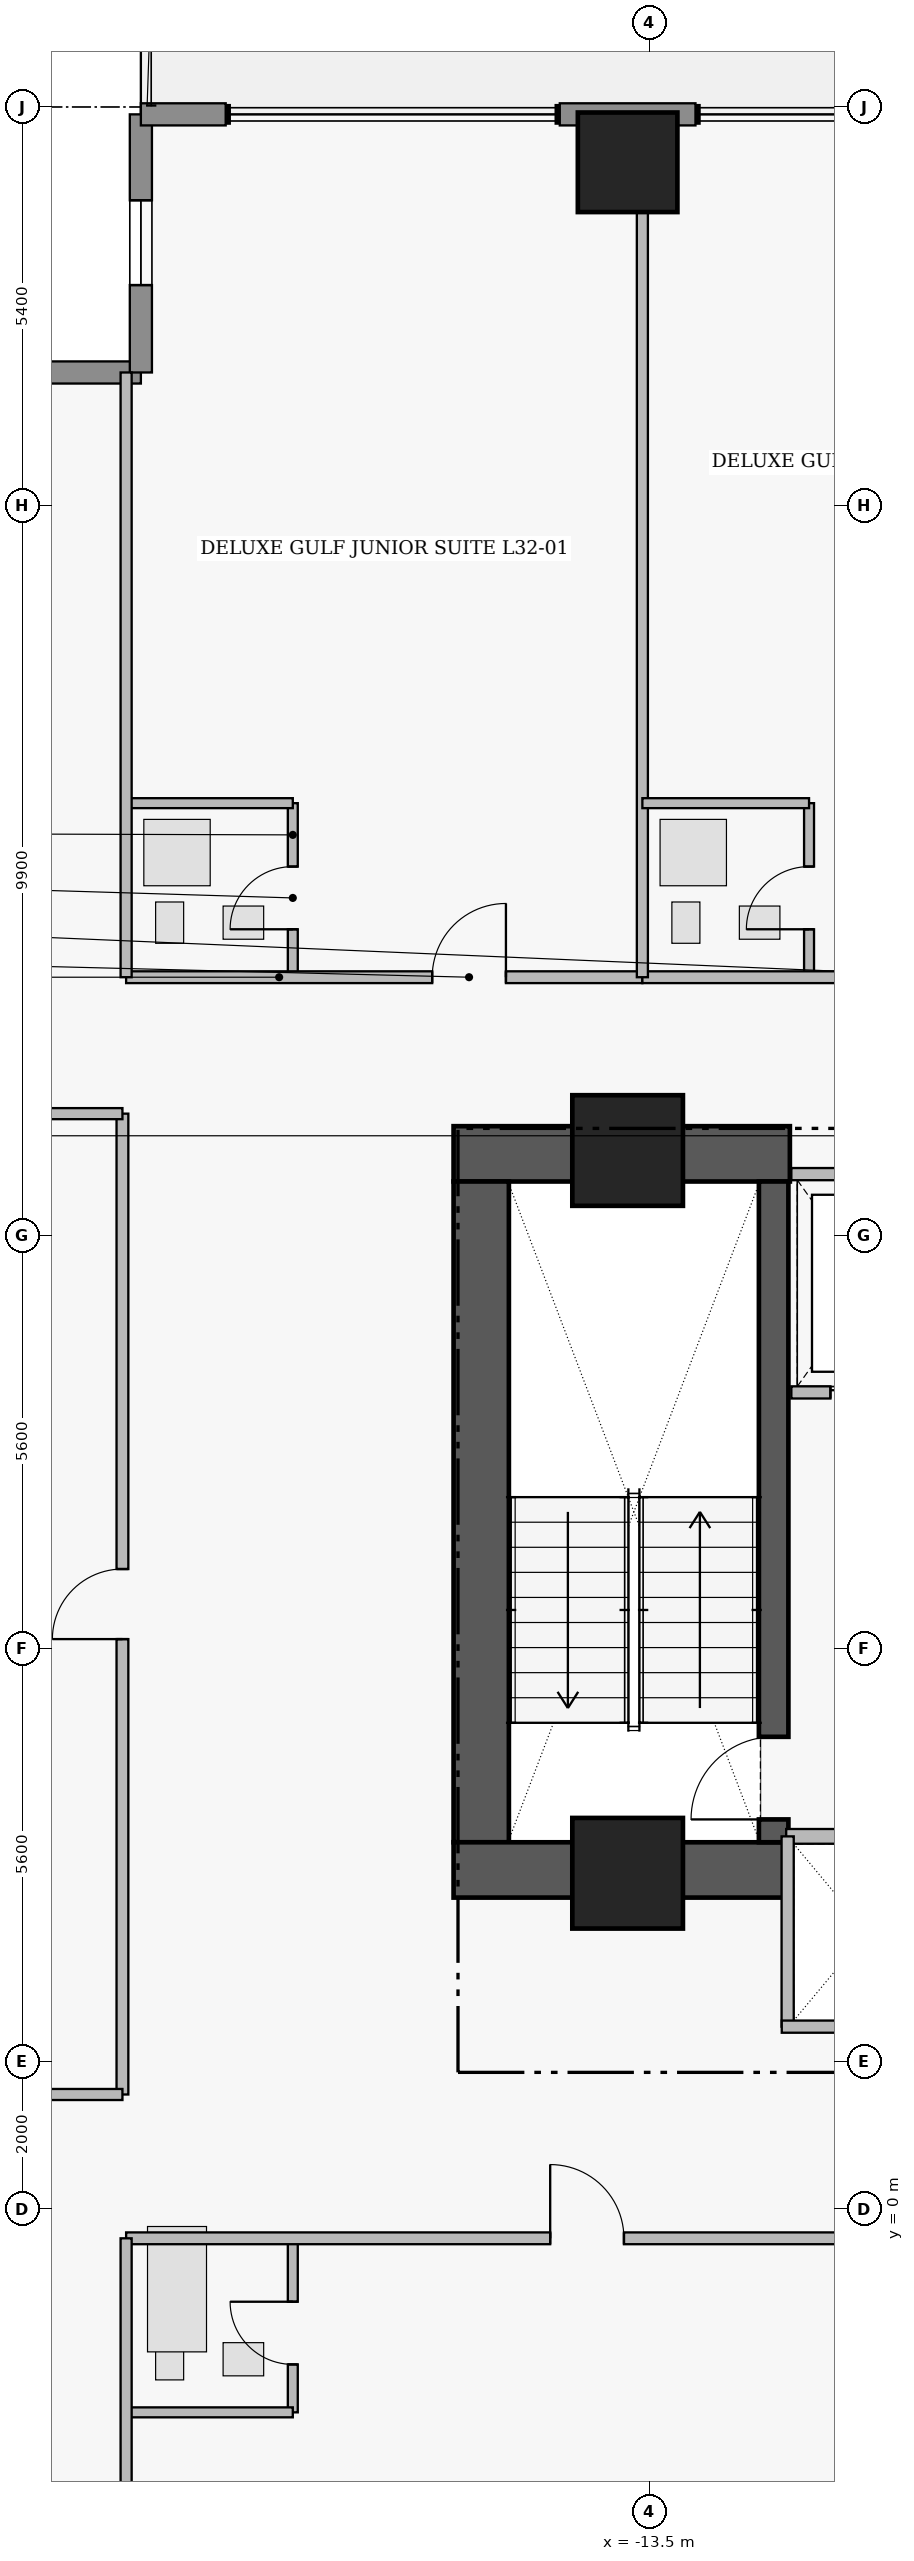
"""IFC4 building model, lengths in metres.
Left out: names, types, materials, properties, quantities, classifications, styles, units other than length and angle.
Written with IfcOpenShell. Run it as: python <this file> out.ifc"""

import sys

from ifc_helpers import new_model, si_unit, direction, frame, frame_2d, origin, origin_2d, place, context, subcontext, project, spatial, rectangle, extrude, element, fill, save


model = new_model("IFC4")
c1 = context("Model", 3, precision=1e-05, world=origin(), true_north=direction((0.0, 1.0)))
c2 = subcontext(c1, "Body", "Model", "MODEL_VIEW")
j1 = project(units=[si_unit("LENGTHUNIT", "METRE"), si_unit("PLANEANGLEUNIT", "RADIAN")], contexts=[c1])
p1 = place(None, origin())
s1 = spatial("IfcSite", under=j1, at=p1, CompositionType="ELEMENT")
p2 = place(p1, origin())
s2 = spatial("IfcBuilding", under=s1, at=p2, CompositionType="ELEMENT")
p3 = place(p2, frame((0.0, 0.0, 128.5)))
s3 = spatial("IfcBuildingStorey", under=s2, at=p3, CompositionType="ELEMENT", Elevation=128.5)
p4 = place(p3, frame((-16.16, 14.305, 0.0), z_axis=(0.0, 0.0, 1.0), x_axis=(1.0, 0.0, 0.0)))
e1 = element("IfcWall", 1, at=p4, inside=s3, PredefinedType="SHEAR", context=c2, shape_type="SweptSolid", body=[
    extrude(rectangle(XDim=4.56, YDim=0.75, at=frame_2d((2.28, 0.0))), origin(), (0.0, 0.0, 1.0), 3.46),
])
p5 = place(p3, frame((-15.785, 4.97, 0.0), z_axis=(0.0, 0.0, 1.0), x_axis=(0.0, 1.0, 0.0)))
e2 = element("IfcWall", 2, at=p5, inside=s3, PredefinedType="SHEAR", context=c2, shape_type="SweptSolid", body=[
    extrude(rectangle(XDim=8.96, YDim=0.75, at=frame_2d((4.48, 0.0))), origin(), (0.0, 0.0, 1.0), 3.46),
])
p6 = place(p3, frame((-16.16, 4.595, 0.0), z_axis=(0.0, 0.0, 1.0), x_axis=(1.0, 0.0, 0.0)))
e3 = element("IfcWall", 3, at=p6, inside=s3, PredefinedType="SHEAR", context=c2, shape_type="SweptSolid", body=[
    extrude(rectangle(XDim=4.56, YDim=0.75, at=frame_2d((2.28, 0.0))), origin(), (0.0, 0.0, 1.0), 3.46),
])
p7 = place(p3, frame((-11.82, 4.97, 0.0), z_axis=(0.0, 0.0, 1.0), x_axis=(0.0, 1.0, 0.0)))
e4 = element("IfcWall", 4, at=p7, inside=s3, PredefinedType="SHEAR", context=c2, shape_type="SweptSolid", body=[
    extrude(rectangle(XDim=8.96, YDim=0.4, at=frame_2d((4.48, 0.0))), origin(), (0.0, 0.0, 1.0), 3.46),
])
p8 = place(p7, frame((0.31, 0.0, 0.0)))
e5 = element("IfcOpeningElement", 5, at=p8, cuts=e4, PredefinedType="OPENING", context=c2, shape_type="SweptSolid", body=[
    extrude(rectangle(XDim=1.12, YDim=2.22, at=frame_2d((0.56, 1.11))), frame((0.0, 0.21, 0.0), z_axis=(0.0, -1.0, 0.0), x_axis=(1.0, 0.0, 0.0)), (0.0, 0.0, 1.0), 0.42),
])
for number, where, z_axis, x_axis in (
    (6, (-13.8, 14.35, 0.0), (0.0, 0.0, 1.0), (1.0, 0.0, 0.0)),
    (7, (-13.8, 4.55, 0.0), (0.0, 0.0, 1.0), (1.0, 0.0, 0.0)),
):
    element("IfcColumn", number, at=place(p3, frame(where, z_axis=z_axis, x_axis=x_axis)), inside=s3, PredefinedType="COLUMN", context=c2, shape_type="SweptSolid", body=[
        extrude(rectangle(XDim=1.5, YDim=1.5, at=origin_2d()), origin(), (0.0, 0.0, 1.0), 3.65),
    ])
p9 = place(p3, frame((-13.8, 27.75, 0.0), z_axis=(0.0, 0.0, 1.0), x_axis=(1.0, 0.0, 0.0)))
e8 = element("IfcColumn", 8, at=p9, inside=s3, PredefinedType="COLUMN", context=c2, shape_type="SweptSolid", body=[
    extrude(rectangle(XDim=1.35, YDim=1.35, at=origin_2d()), origin(), (0.0, 0.0, 1.0), 3.65),
])
p10 = place(p3, frame((-23.9, 24.9, 0.0), z_axis=(0.0, 0.0, 1.0), x_axis=(1.0, 0.0, 0.0)))
e9 = element("IfcWall", 9, at=p10, inside=s3, PredefinedType="STANDARD", context=c2, shape_type="SweptSolid", body=[
    extrude(rectangle(XDim=3.5, YDim=0.3, at=frame_2d((1.75, 0.0))), origin(), (0.0, 0.0, 1.0), 3.43),
])
p11 = place(p10, frame((1.065, 0.0, 1.25)))
e10 = element("IfcOpeningElement", 10, at=p11, cuts=e9, PredefinedType="OPENING", context=c2, shape_type="SweptSolid", body=[
    extrude(rectangle(XDim=1.15, YDim=1.55, at=frame_2d((0.575, 0.775))), frame((0.0, 0.16, 0.0), z_axis=(0.0, -1.0, 0.0), x_axis=(1.0, 0.0, 0.0)), (0.0, 0.0, 1.0), 0.32),
])
p12 = place(p3, frame((-20.4, 24.9, 0.0), z_axis=(0.0, 0.0, 1.0), x_axis=(0.0, 1.0, 0.0)))
e11 = element("IfcWall", 11, at=p12, inside=s3, PredefinedType="STANDARD", context=c2, shape_type="SweptSolid", body=[
    extrude(rectangle(XDim=3.5, YDim=0.3, at=frame_2d((1.75, 0.0))), origin(), (0.0, 0.0, 1.0), 3.43),
])
p13 = place(p12, frame((1.185, 0.0, 1.25)))
e12 = element("IfcOpeningElement", 12, at=p13, cuts=e11, PredefinedType="OPENING", context=c2, shape_type="SweptSolid", body=[
    extrude(rectangle(XDim=1.15, YDim=1.55, at=frame_2d((0.575, 0.775))), frame((0.0, 0.16, 0.0), z_axis=(0.0, -1.0, 0.0), x_axis=(1.0, 0.0, 0.0)), (0.0, 0.0, 1.0), 0.32),
])
p14 = place(p3, frame((-20.4, 28.4, 0.0), z_axis=(0.0, 0.0, 1.0), x_axis=(1.0, 0.0, 0.0)))
e13 = element("IfcWall", 13, at=p14, inside=s3, PredefinedType="STANDARD", context=c2, shape_type="SweptSolid", body=[
    extrude(rectangle(XDim=1.15, YDim=0.3, at=frame_2d((0.575, 0.0))), origin(), (0.0, 0.0, 1.0), 3.43),
])
p15 = place(p3, frame((-14.72, 28.4, 0.0), z_axis=(0.0, 0.0, 1.0), x_axis=(1.0, 0.0, 0.0)))
e14 = element("IfcWall", 14, at=p15, inside=s3, PredefinedType="STANDARD", context=c2, shape_type="SweptSolid", body=[
    extrude(rectangle(XDim=1.84, YDim=0.3, at=frame_2d((0.92, 0.0))), origin(), (0.0, 0.0, 1.0), 3.43),
])
p16 = place(p3, frame((-11.58, 11.07, 0.0), z_axis=(0.0, 0.0, 1.0), x_axis=(1.0, 0.0, 0.0)))
e15 = element("IfcWall", 15, at=p16, inside=s3, PredefinedType="PARTITIONING", context=c2, shape_type="SweptSolid", body=[
    extrude(rectangle(XDim=2.16, YDim=0.165, at=frame_2d((1.08, 0.0))), origin(), (0.0, 0.0, 1.0), 3.43),
])
p17 = place(p16, frame((0.53, 0.0, 0.0)))
e16 = element("IfcOpeningElement", 16, at=p17, cuts=e15, PredefinedType="OPENING", context=c2, shape_type="SweptSolid", body=[
    extrude(rectangle(XDim=1.15, YDim=2.25, at=frame_2d((0.575, 1.125))), frame((0.0, 0.093, 0.0), z_axis=(0.0, -1.0, 0.0), x_axis=(1.0, 0.0, 0.0)), (0.0, 0.0, 1.0), 0.185),
])
p18 = place(p3, frame((-18.34, 16.7, 0.0), z_axis=(0.0, 0.0, 1.0), x_axis=(0.0, 1.0, 0.0)))
e17 = element("IfcWall", 17, at=p18, inside=s3, PredefinedType="PLUMBINGWALL", context=c2, shape_type="SweptSolid", body=[
    extrude(rectangle(XDim=2.36, YDim=0.135, at=frame_2d((1.18, 0.0))), origin(), (0.0, 0.0, 1.0), 3.43),
])
p19 = place(p18, frame((0.65, 0.0, 0.0)))
e18 = element("IfcOpeningElement", 18, at=p19, cuts=e17, PredefinedType="OPENING", context=c2, shape_type="SweptSolid", body=[
    extrude(rectangle(XDim=0.85, YDim=2.1, at=frame_2d((0.425, 1.05))), frame((0.0, 0.077, 0.0), z_axis=(0.0, -1.0, 0.0), x_axis=(1.0, 0.0, 0.0)), (0.0, 0.0, 1.0), 0.155),
])
p20 = place(p3, frame((-20.6, 16.7, 0.0), z_axis=(0.0, 0.0, 1.0), x_axis=(1.0, 0.0, 0.0)))
e19 = element("IfcWall", 19, at=p20, inside=s3, PredefinedType="PARTITIONING", context=c2, shape_type="SweptSolid", body=[
    extrude(rectangle(XDim=7.0, YDim=0.16, at=frame_2d((3.5, 0.0))), origin(), (0.0, 0.0, 1.0), 3.43),
])
p21 = place(p20, frame((4.15, 0.0, 0.0)))
e20 = element("IfcOpeningElement", 20, at=p21, cuts=e19, PredefinedType="OPENING", context=c2, shape_type="SweptSolid", body=[
    extrude(rectangle(XDim=1.0, YDim=2.15, at=frame_2d((0.5, 1.075))), frame((0.0, 0.09, 0.0), z_axis=(0.0, -1.0, 0.0), x_axis=(1.0, 0.0, 0.0)), (0.0, 0.0, 1.0), 0.18),
])
p22 = place(p3, frame((-11.34, 16.7, 0.0), z_axis=(0.0, 0.0, 1.0), x_axis=(0.0, 1.0, 0.0)))
e21 = element("IfcWall", 21, at=p22, inside=s3, PredefinedType="PLUMBINGWALL", context=c2, shape_type="SweptSolid", body=[
    extrude(rectangle(XDim=2.36, YDim=0.135, at=frame_2d((1.18, 0.0))), origin(), (0.0, 0.0, 1.0), 3.43),
])
p23 = place(p22, frame((0.65, 0.0, 0.0)))
e22 = element("IfcOpeningElement", 22, at=p23, cuts=e21, PredefinedType="OPENING", context=c2, shape_type="SweptSolid", body=[
    extrude(rectangle(XDim=0.85, YDim=2.1, at=frame_2d((0.425, 1.05))), frame((0.0, 0.077, 0.0), z_axis=(0.0, -1.0, 0.0), x_axis=(1.0, 0.0, 0.0)), (0.0, 0.0, 1.0), 0.155),
])
p24 = place(p3, frame((-13.6, 16.7, 0.0), z_axis=(0.0, 0.0, 1.0), x_axis=(1.0, 0.0, 0.0)))
e23 = element("IfcWall", 23, at=p24, inside=s3, PredefinedType="PARTITIONING", context=c2, shape_type="SweptSolid", body=[
    extrude(rectangle(XDim=6.8, YDim=0.16, at=frame_2d((3.4, 0.0))), origin(), (0.0, 0.0, 1.0), 2.973),
])
p25 = place(p24, frame((4.075, 0.0, 0.0)))
e24 = element("IfcOpeningElement", 24, at=p25, cuts=e23, PredefinedType="OPENING", context=c2, shape_type="SweptSolid", body=[
    extrude(rectangle(XDim=0.95, YDim=2.15, at=frame_2d((0.475, 1.075))), frame((0.0, 0.09, 0.0), z_axis=(0.0, -1.0, 0.0), x_axis=(1.0, 0.0, 0.0)), (0.0, 0.0, 1.0), 0.18),
])
p26 = place(p3, frame((-18.34, -2.76, 0.0), z_axis=(0.0, 0.0, 1.0), x_axis=(0.0, 1.0, 0.0)))
e25 = element("IfcWall", 25, at=p26, inside=s3, PredefinedType="PLUMBINGWALL", context=c2, shape_type="SweptSolid", body=[
    extrude(rectangle(XDim=2.36, YDim=0.135, at=frame_2d((1.18, 0.0))), origin(), (0.0, 0.0, 1.0), 3.43),
])
p27 = place(p26, frame((0.65, 0.0, 0.0)))
e26 = element("IfcOpeningElement", 26, at=p27, cuts=e25, PredefinedType="OPENING", context=c2, shape_type="SweptSolid", body=[
    extrude(rectangle(XDim=0.85, YDim=2.1, at=frame_2d((0.425, 1.05))), frame((0.0, 0.077, 0.0), z_axis=(0.0, -1.0, 0.0), x_axis=(1.0, 0.0, 0.0)), (0.0, 0.0, 1.0), 0.155),
])
p28 = place(p3, frame((-20.6, -0.4, 0.0), z_axis=(0.0, 0.0, 1.0), x_axis=(1.0, 0.0, 0.0)))
e27 = element("IfcWall", 27, at=p28, inside=s3, PredefinedType="PARTITIONING", context=c2, shape_type="SweptSolid", body=[
    extrude(rectangle(XDim=10.2, YDim=0.16, at=frame_2d((5.1, 0.0))), origin(), (0.0, 0.0, 1.0), 3.43),
])
p29 = place(p28, frame((5.75, 0.0, 0.0)))
e28 = element("IfcOpeningElement", 28, at=p29, cuts=e27, PredefinedType="OPENING", context=c2, shape_type="SweptSolid", body=[
    extrude(rectangle(XDim=1.0, YDim=2.15, at=frame_2d((0.5, 1.075))), frame((0.0, 0.09, 0.0), z_axis=(0.0, -1.0, 0.0), x_axis=(1.0, 0.0, 0.0)), (0.0, 0.0, 1.0), 0.18),
])
p30 = place(p3, frame((-20.65, 1.55, 0.0), z_axis=(0.0, 0.0, 1.0), x_axis=(0.0, 1.0, 0.0)))
e29 = element("IfcWall", 29, at=p30, inside=s3, PredefinedType="PARTITIONING", context=c2, shape_type="SweptSolid", body=[
    extrude(rectangle(XDim=13.3, YDim=0.16, at=frame_2d((6.65, 0.0))), origin(), (0.0, 0.0, 1.0), 3.43),
])
p31 = place(p30, frame((6.175, 0.0, 0.0)))
e30 = element("IfcOpeningElement", 30, at=p31, cuts=e29, PredefinedType="OPENING", context=c2, shape_type="SweptSolid", body=[
    extrude(rectangle(XDim=0.95, YDim=2.15, at=frame_2d((0.475, 1.075))), frame((0.0, 0.09, 0.0), z_axis=(0.0, -1.0, 0.0), x_axis=(1.0, 0.0, 0.0)), (0.0, 0.0, 1.0), 0.18),
])
p32 = place(p3, frame((-11.65, 5.05, 0.0), z_axis=(0.0, 0.0, 1.0), x_axis=(1.0, 0.0, 0.0)))
e31 = element("IfcWall", 31, at=p32, inside=s3, PredefinedType="PARTITIONING", context=c2, shape_type="SweptSolid", body=[
    extrude(rectangle(XDim=2.85, YDim=0.2, at=frame_2d((1.425, 0.0))), origin(), (0.0, 0.0, 1.0), 3.43),
])
p33 = place(p3, frame((-11.58, 14.03, 0.0), z_axis=(0.0, 0.0, 1.0), x_axis=(1.0, 0.0, 0.0)))
e32 = element("IfcWall", 32, at=p33, inside=s3, PredefinedType="PARTITIONING", context=c2, shape_type="SweptSolid", body=[
    extrude(rectangle(XDim=2.16, YDim=0.165, at=frame_2d((1.08, 0.0))), origin(), (0.0, 0.0, 1.0), 3.43),
])
p34 = place(p3, frame((-11.63, 2.47, 0.0), z_axis=(0.0, 0.0, 1.0), x_axis=(0.0, 1.0, 0.0)))
e33 = element("IfcWall", 33, at=p34, inside=s3, PredefinedType="PARTITIONING", context=c2, shape_type="SweptSolid", body=[
    extrude(rectangle(XDim=2.58, YDim=0.165, at=frame_2d((1.29, 0.0))), origin(), (0.0, 0.0, 1.0), 3.43),
])
p35 = place(p3, frame((-11.71, 2.47, 0.0), z_axis=(0.0, 0.0, 1.0), x_axis=(1.0, 0.0, 0.0)))
e34 = element("IfcWall", 34, at=p35, inside=s3, PredefinedType="PARTITIONING", context=c2, shape_type="SweptSolid", body=[
    extrude(rectangle(XDim=2.31, YDim=0.165, at=frame_2d((1.155, 0.0))), origin(), (0.0, 0.0, 1.0), 2.03),
])
p36 = place(p3, frame((-20.6, 19.06, 0.0), z_axis=(0.0, 0.0, 1.0), x_axis=(1.0, 0.0, 0.0)))
e35 = element("IfcWall", 35, at=p36, inside=s3, PredefinedType="PLUMBINGWALL", context=c2, shape_type="SweptSolid", body=[
    extrude(rectangle(XDim=2.26, YDim=0.135, at=frame_2d((1.13, 0.0))), origin(), (0.0, 0.0, 1.0), 3.43),
])
p37 = place(p3, frame((-20.6, 16.7, 0.0), z_axis=(0.0, 0.0, 1.0), x_axis=(0.0, 1.0, 0.0)))
e36 = element("IfcWall", 36, at=p37, inside=s3, PredefinedType="PARTITIONING", context=c2, shape_type="SweptSolid", body=[
    extrude(rectangle(XDim=8.2, YDim=0.15, at=frame_2d((4.1, 0.0))), origin(), (0.0, 0.0, 1.0), 3.43),
])
p38 = place(p3, frame((-13.6, 16.7, 0.0), z_axis=(0.0, 0.0, 1.0), x_axis=(0.0, 1.0, 0.0)))
e37 = element("IfcWall", 37, at=p38, inside=s3, PredefinedType="PARTITIONING", context=c2, shape_type="SweptSolid", body=[
    extrude(rectangle(XDim=11.62, YDim=0.15, at=frame_2d((5.81, 0.0))), origin(), (0.0, 0.0, 1.0), 2.503),
])
p39 = place(p3, frame((-13.6, 19.06, 0.0), z_axis=(0.0, 0.0, 1.0), x_axis=(1.0, 0.0, 0.0)))
e38 = element("IfcWall", 38, at=p39, inside=s3, PredefinedType="PLUMBINGWALL", context=c2, shape_type="SweptSolid", body=[
    extrude(rectangle(XDim=2.26, YDim=0.135, at=frame_2d((1.13, 0.0))), origin(), (0.0, 0.0, 1.0), 2.973),
])
p40 = place(p3, frame((-20.6, -2.76, 0.0), z_axis=(0.0, 0.0, 1.0), x_axis=(1.0, 0.0, 0.0)))
e39 = element("IfcWall", 39, at=p40, inside=s3, PredefinedType="PLUMBINGWALL", context=c2, shape_type="SweptSolid", body=[
    extrude(rectangle(XDim=2.26, YDim=0.135, at=frame_2d((1.13, 0.0))), origin(), (0.0, 0.0, 1.0), 3.43),
])
p41 = place(p3, frame((-20.6, -11.9, 0.0), z_axis=(0.0, 0.0, 1.0), x_axis=(0.0, 1.0, 0.0)))
e40 = element("IfcWall", 40, at=p41, inside=s3, PredefinedType="PARTITIONING", context=c2, shape_type="SweptSolid", body=[
    extrude(rectangle(XDim=11.5, YDim=0.15, at=frame_2d((5.75, 0.0))), origin(), (0.0, 0.0, 1.0), 3.43),
])
p42 = place(p3, frame((-23.867, 1.55, 0.0), z_axis=(0.0, 0.0, 1.0), x_axis=(1.0, 0.0, 0.0)))
e41 = element("IfcWall", 41, at=p42, inside=s3, PredefinedType="PARTITIONING", context=c2, shape_type="SweptSolid", body=[
    extrude(rectangle(XDim=3.217, YDim=0.15, at=frame_2d((1.608, 0.0))), origin(), (0.0, 0.0, 1.0), 3.43),
])
p43 = place(p3, frame((-23.84, 14.85, 0.0), z_axis=(0.0, 0.0, 1.0), x_axis=(1.0, 0.0, 0.0)))
e42 = element("IfcWall", 42, at=p43, inside=s3, PredefinedType="PARTITIONING", context=c2, shape_type="SweptSolid", body=[
    extrude(rectangle(XDim=3.19, YDim=0.15, at=frame_2d((1.595, 0.0))), origin(), (0.0, 0.0, 1.0), 3.43),
])
p44 = place(p13, origin())
e43 = element("IfcWindow", 43, at=p44, inside=s3, PartitioningType="SINGLE_PANEL", PredefinedType="WINDOW", context=c2, shape_type="SweptSolid", body=[
    extrude(rectangle(XDim=1.15, YDim=1.55, at=frame_2d((0.575, 0.775))), frame((0.0, 0.03, 0.0), z_axis=(0.0, -1.0, 0.0), x_axis=(1.0, 0.0, 0.0)), (0.0, 0.0, 1.0), 0.06),
])
fill(e12, e43)
p45 = place(p8, origin())
e44 = element("IfcDoor", 44, at=p45, inside=s3, OperationType="SINGLE_SWING_LEFT", PredefinedType="DOOR", context=c2, shape_type="SweptSolid", body=[
    extrude(rectangle(XDim=1.12, YDim=2.22, at=frame_2d((0.56, 1.11))), frame((0.0, 0.025, 0.0), z_axis=(0.0, -1.0, 0.0), x_axis=(1.0, 0.0, 0.0)), (0.0, 0.0, 1.0), 0.05),
])
fill(e5, e44)
p46 = place(p17, origin())
e45 = element("IfcDoor", 45, at=p46, inside=s3, OperationType="SLIDING_TO_LEFT", PredefinedType="DOOR", context=c2, shape_type="SweptSolid", body=[
    extrude(rectangle(XDim=1.15, YDim=2.25, at=frame_2d((0.575, 1.125))), frame((0.0, 0.025, 0.0), z_axis=(0.0, -1.0, 0.0), x_axis=(1.0, 0.0, 0.0)), (0.0, 0.0, 1.0), 0.05),
])
fill(e16, e45)
p47 = place(p19, origin())
e46 = element("IfcDoor", 46, at=p47, inside=s3, OperationType="SINGLE_SWING_LEFT", PredefinedType="DOOR", context=c2, shape_type="SweptSolid", body=[
    extrude(rectangle(XDim=0.85, YDim=2.1, at=frame_2d((0.425, 1.05))), frame((0.0, 0.025, 0.0), z_axis=(0.0, -1.0, 0.0), x_axis=(1.0, 0.0, 0.0)), (0.0, 0.0, 1.0), 0.05),
])
fill(e18, e46)
p48 = place(p21, origin())
e47 = element("IfcDoor", 47, at=p48, inside=s3, OperationType="SINGLE_SWING_RIGHT", PredefinedType="DOOR", context=c2, shape_type="SweptSolid", body=[
    extrude(rectangle(XDim=1.0, YDim=2.15, at=frame_2d((0.5, 1.075))), frame((0.0, 0.025, 0.0), z_axis=(0.0, -1.0, 0.0), x_axis=(1.0, 0.0, 0.0)), (0.0, 0.0, 1.0), 0.05),
])
fill(e20, e47)
p49 = place(p23, origin())
e48 = element("IfcDoor", 48, at=p49, inside=s3, OperationType="SINGLE_SWING_LEFT", PredefinedType="DOOR", context=c2, shape_type="SweptSolid", body=[
    extrude(rectangle(XDim=0.85, YDim=2.1, at=frame_2d((0.425, 1.05))), frame((0.0, 0.025, 0.0), z_axis=(0.0, -1.0, 0.0), x_axis=(1.0, 0.0, 0.0)), (0.0, 0.0, 1.0), 0.05),
])
fill(e22, e48)
p50 = place(p27, origin())
e49 = element("IfcDoor", 49, at=p50, inside=s3, OperationType="SINGLE_SWING_RIGHT", PredefinedType="DOOR", context=c2, shape_type="SweptSolid", body=[
    extrude(rectangle(XDim=0.85, YDim=2.1, at=frame_2d((0.425, 1.05))), frame((0.0, 0.025, 0.0), z_axis=(0.0, -1.0, 0.0), x_axis=(1.0, 0.0, 0.0)), (0.0, 0.0, 1.0), 0.05),
])
fill(e26, e49)
p51 = place(p29, origin())
e50 = element("IfcDoor", 50, at=p51, inside=s3, OperationType="SINGLE_SWING_LEFT", PredefinedType="DOOR", context=c2, shape_type="SweptSolid", body=[
    extrude(rectangle(XDim=1.0, YDim=2.15, at=frame_2d((0.5, 1.075))), frame((0.0, 0.025, 0.0), z_axis=(0.0, -1.0, 0.0), x_axis=(1.0, 0.0, 0.0)), (0.0, 0.0, 1.0), 0.05),
])
fill(e28, e50)
p52 = place(p31, origin())
e51 = element("IfcDoor", 51, at=p52, inside=s3, OperationType="SINGLE_SWING_LEFT", PredefinedType="DOOR", context=c2, shape_type="SweptSolid", body=[
    extrude(rectangle(XDim=0.95, YDim=2.15, at=frame_2d((0.475, 1.075))), frame((0.0, 0.025, 0.0), z_axis=(0.0, -1.0, 0.0), x_axis=(1.0, 0.0, 0.0)), (0.0, 0.0, 1.0), 0.05),
])
fill(e30, e51)
save(model, sys.argv[1])
